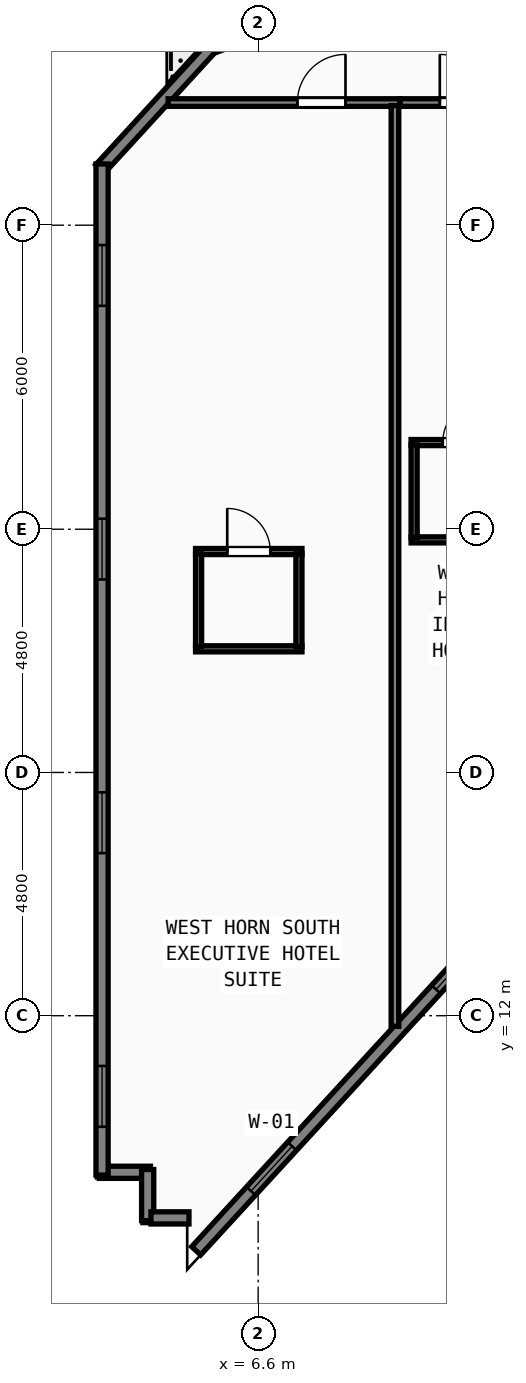
"""IFC4 building model, lengths in metres.
Left out: names, types, materials, properties, quantities, classifications, styles, units other than length and angle.
Written with IfcOpenShell. Run it as: python <this file> out.ifc"""

import sys

from ifc_helpers import new_model, si_unit, direction, frame, frame_2d, origin, origin_2d, place, context, subcontext, project, spatial, rectangle, hollow_rectangle, extrude, element, fill, save


model = new_model("IFC4")
c1 = context("Model", 3, precision=1e-05, world=origin(), true_north=direction((0.0, 1.0)))
c2 = subcontext(c1, "Body", "Model", "MODEL_VIEW")
j1 = project(units=[si_unit("LENGTHUNIT", "METRE"), si_unit("PLANEANGLEUNIT", "RADIAN")], contexts=[c1])
p1 = place(None, origin())
s1 = spatial("IfcSite", under=j1, at=p1, CompositionType="ELEMENT")
p2 = place(p1, origin())
s2 = spatial("IfcBuilding", under=s1, at=p2, CompositionType="ELEMENT")
p3 = place(p2, frame((0.0, 0.0, 24.0)))
s3 = spatial("IfcBuildingStorey", under=s2, at=p3, CompositionType="ELEMENT", Elevation=24.0)
for number, where, z_axis, x_axis in (
    (1, (6.0, 17.4, 0.0), (0.0, 0.0, 1.0), (1.0, 0.0, 0.0)),
    (2, (6.0, 27.6, 0.0), (0.0, 0.0, 1.0), (1.0, 0.0, 0.0)),
):
    element("IfcColumn", number, at=place(p3, frame(where, z_axis=z_axis, x_axis=x_axis)), inside=s3, PredefinedType="COLUMN", context=c2, shape_type="SweptSolid", body=[
        extrude(hollow_rectangle(XDim=1.15, YDim=1.15, WallThickness=0.042, at=origin_2d()), origin(), (0.0, 0.0, 1.0), 3.8),
    ])
for number, where, z_axis, x_axis in (
    (3, (9.3, 17.1, -0.26), (0.0, 0.0, 1.0), (1.0, 0.0, 0.0)),
    (4, (9.3, 27.6, -0.26), (0.0, 0.0, 1.0), (1.0, 0.0, 0.0)),
):
    element("IfcColumn", number, at=place(p3, frame(where, z_axis=z_axis, x_axis=x_axis)), inside=s3, PredefinedType="COLUMN", context=c2, shape_type="SweptSolid", body=[
        extrude(hollow_rectangle(XDim=1.0, YDim=1.0, WallThickness=0.038, at=origin_2d()), origin(), (0.0, 0.0, 1.0), 4.06),
    ])
for number, where, z_axis, x_axis in (
    (5, (3.465, 8.91, 0.0), (0.0, 0.0, 1.0), (1.0, 0.0, 0.0)),
    (6, (4.42, 8.965, 0.0), (0.0, 0.0, 1.0), (0.0, -1.0, 0.0)),
):
    element("IfcWall", number, at=place(p3, frame(where, z_axis=z_axis, x_axis=x_axis)), inside=s3, PredefinedType="SOLIDWALL", context=c2, shape_type="SweptSolid", body=[
        extrude(rectangle(XDim=1.01, YDim=0.24, at=frame_2d((0.505, 0.0))), origin(), (0.0, 0.0, 1.0), 3.6),
    ])
p4 = place(p3, frame((4.485, 8.01, 0.0), z_axis=(0.0, 0.0, 1.0), x_axis=(1.0, 0.0, 0.0)))
e7 = element("IfcWall", 7, at=p4, inside=s3, PredefinedType="SOLIDWALL", context=c2, shape_type="SweptSolid", body=[
    extrude(rectangle(XDim=0.75, YDim=0.24, at=frame_2d((0.375, 0.0))), origin(), (0.0, 0.0, 1.0), 3.6),
])
p5 = place(p3, frame((5.377, 7.361, 0.0), z_axis=(0.0, 0.0, 1.0), x_axis=(0.676129143807, 0.736783130165, 0.0)))
e8 = element("IfcWall", 8, at=p5, inside=s3, PredefinedType="SOLIDWALL", context=c2, shape_type="SweptSolid", body=[
    extrude(rectangle(XDim=9.672, YDim=0.24, at=frame_2d((4.836, 0.0))), origin(), (0.0, 0.0, 1.0), 3.6),
])
p6 = place(p5, frame((1.6, 0.0, 0.85)))
e9 = element("IfcOpeningElement", 9, at=p6, cuts=e8, PredefinedType="OPENING", context=c2, shape_type="SweptSolid", body=[
    extrude(rectangle(XDim=1.2, YDim=1.85, at=frame_2d((0.6, 0.925))), frame((0.0, 0.13, 0.0), z_axis=(0.0, -1.0, 0.0), x_axis=(1.0, 0.0, 0.0)), (0.0, 0.0, 1.0), 0.26),
])
p7 = place(p5, frame((7.0, 0.0, 0.85)))
e10 = element("IfcOpeningElement", 10, at=p7, cuts=e8, PredefinedType="OPENING", context=c2, shape_type="SweptSolid", body=[
    extrude(rectangle(XDim=1.2, YDim=1.85, at=frame_2d((0.6, 0.925))), frame((0.0, 0.13, 0.0), z_axis=(0.0, -1.0, 0.0), x_axis=(1.0, 0.0, 0.0)), (0.0, 0.0, 1.0), 0.26),
])
p8 = place(p3, frame((12.171, 33.536, 0.0), z_axis=(0.0, 0.0, 1.0), x_axis=(-0.936327744176, -0.351127263946, 0.0)))
e11 = element("IfcWall", 11, at=p8, inside=s3, PredefinedType="SOLIDWALL", context=c2, shape_type="SweptSolid", body=[
    extrude(rectangle(XDim=7.0, YDim=0.24, at=frame_2d((3.5, 0.0))), origin(), (0.0, 0.0, 1.0), 3.6),
])
p9 = place(p8, frame((1.6, 0.0, 0.85)))
e12 = element("IfcOpeningElement", 12, at=p9, cuts=e11, PredefinedType="OPENING", context=c2, shape_type="SweptSolid", body=[
    extrude(rectangle(XDim=1.2, YDim=1.85, at=frame_2d((0.6, 0.925))), frame((0.0, 0.13, 0.0), z_axis=(0.0, -1.0, 0.0), x_axis=(1.0, 0.0, 0.0)), (0.0, 0.0, 1.0), 0.26),
])
p10 = place(p3, frame((5.706, 31.138, 0.0), z_axis=(0.0, 0.0, 1.0), x_axis=(-0.675758228752, -0.737123338577, 0.0)))
e13 = element("IfcWall", 13, at=p10, inside=s3, PredefinedType="SOLIDWALL", context=c2, shape_type="SweptSolid", body=[
    extrude(rectangle(XDim=3.29, YDim=0.24, at=frame_2d((1.645, 0.0))), origin(), (0.0, 0.0, 1.0), 3.6),
])
p11 = place(p3, frame((3.52, 28.808, 0.0), z_axis=(0.0, 0.0, 1.0), x_axis=(0.0, -1.0, 0.0)))
e14 = element("IfcWall", 14, at=p11, inside=s3, PredefinedType="SOLIDWALL", context=c2, shape_type="SweptSolid", body=[
    extrude(rectangle(XDim=19.953, YDim=0.24, at=frame_2d((9.977, 0.0))), origin(), (0.0, 0.0, 1.0), 3.6),
])
p12 = place(p11, frame((1.6, 0.0, 0.85)))
e15 = element("IfcOpeningElement", 15, at=p12, cuts=e14, PredefinedType="OPENING", context=c2, shape_type="SweptSolid", body=[
    extrude(rectangle(XDim=1.2, YDim=1.85, at=frame_2d((0.6, 0.925))), frame((0.0, 0.13, 0.0), z_axis=(0.0, -1.0, 0.0), x_axis=(1.0, 0.0, 0.0)), (0.0, 0.0, 1.0), 0.26),
])
p13 = place(p11, frame((7.0, 0.0, 0.85)))
e16 = element("IfcOpeningElement", 16, at=p13, cuts=e14, PredefinedType="OPENING", context=c2, shape_type="SweptSolid", body=[
    extrude(rectangle(XDim=1.2, YDim=1.85, at=frame_2d((0.6, 0.925))), frame((0.0, 0.13, 0.0), z_axis=(0.0, -1.0, 0.0), x_axis=(1.0, 0.0, 0.0)), (0.0, 0.0, 1.0), 0.26),
])
p14 = place(p11, frame((12.4, 0.0, 0.85)))
e17 = element("IfcOpeningElement", 17, at=p14, cuts=e14, PredefinedType="OPENING", context=c2, shape_type="SweptSolid", body=[
    extrude(rectangle(XDim=1.2, YDim=1.85, at=frame_2d((0.6, 0.925))), frame((0.0, 0.13, 0.0), z_axis=(0.0, -1.0, 0.0), x_axis=(1.0, 0.0, 0.0)), (0.0, 0.0, 1.0), 0.26),
])
p15 = place(p11, frame((17.8, 0.0, 0.85)))
e18 = element("IfcOpeningElement", 18, at=p15, cuts=e14, PredefinedType="OPENING", context=c2, shape_type="SweptSolid", body=[
    extrude(rectangle(XDim=1.2, YDim=1.85, at=frame_2d((0.6, 0.925))), frame((0.0, 0.13, 0.0), z_axis=(0.0, -1.0, 0.0), x_axis=(1.0, 0.0, 0.0)), (0.0, 0.0, 1.0), 0.26),
])
p16 = place(p3, frame((4.823, 30.02, 0.0), z_axis=(0.0, 0.0, 1.0), x_axis=(1.0, 0.0, 0.0)))
e19 = element("IfcWall", 19, at=p16, inside=s3, PredefinedType="PARTITIONING", context=c2, shape_type="SweptSolid", body=[
    extrude(rectangle(XDim=4.576, YDim=0.15, at=frame_2d((2.288, 0.0))), origin(), (0.0, 0.0, 1.0), 3.6),
])
p17 = place(p16, frame((3.5, 0.0, 0.0), z_axis=(0.0, 0.0, 1.0), x_axis=(-1.0, 0.0, 0.0)))
e20 = element("IfcOpeningElement", 20, at=p17, cuts=e19, PredefinedType="OPENING", context=c2, shape_type="SweptSolid", body=[
    extrude(rectangle(XDim=0.95, YDim=2.18, at=frame_2d((0.475, 1.09))), frame((0.0, 0.085, 0.0), z_axis=(0.0, -1.0, 0.0), x_axis=(1.0, 0.0, 0.0)), (0.0, 0.0, 1.0), 0.17),
])
p18 = place(p3, frame((9.3, 11.791, 0.0), z_axis=(0.0, 0.0, 1.0), x_axis=(0.0, 1.0, 0.0)))
e21 = element("IfcWall", 21, at=p18, inside=s3, PredefinedType="PARTITIONING", context=c2, shape_type="SweptSolid", body=[
    extrude(rectangle(XDim=18.169, YDim=0.15, at=frame_2d((9.085, 0.0))), origin(), (0.0, 0.0, 1.0), 3.6),
])
p19 = place(p3, frame((5.365, 21.16, 0.0), z_axis=(0.0, 0.0, 1.0), x_axis=(1.0, 0.0, 0.0)))
e22 = element("IfcWall", 22, at=p19, inside=s3, PredefinedType="PARTITIONING", context=c2, shape_type="SweptSolid", body=[
    extrude(rectangle(XDim=2.1, YDim=0.12, at=frame_2d((1.05, 0.0))), origin(), (0.0, 0.0, 1.0), 3.6),
])
p20 = place(p19, frame((1.475, 0.0, 0.0), z_axis=(0.0, 0.0, 1.0), x_axis=(-1.0, 0.0, 0.0)))
e23 = element("IfcOpeningElement", 23, at=p20, cuts=e22, PredefinedType="OPENING", context=c2, shape_type="SweptSolid", body=[
    extrude(rectangle(XDim=0.85, YDim=2.1, at=frame_2d((0.425, 1.05))), frame((0.0, 0.07, 0.0), z_axis=(0.0, -1.0, 0.0), x_axis=(1.0, 0.0, 0.0)), (0.0, 0.0, 1.0), 0.14),
])
p21 = place(p3, frame((5.365, 19.24, 0.0), z_axis=(0.0, 0.0, 1.0), x_axis=(1.0, 0.0, 0.0)))
e24 = element("IfcWall", 24, at=p21, inside=s3, PredefinedType="PARTITIONING", context=c2, shape_type="SweptSolid", body=[
    extrude(rectangle(XDim=2.1, YDim=0.12, at=frame_2d((1.05, 0.0))), origin(), (0.0, 0.0, 1.0), 3.6),
])
for number, where, z_axis, x_axis in (
    (25, (5.425, 19.285, 0.0), (0.0, 0.0, 1.0), (0.0, 1.0, 0.0)),
    (26, (7.405, 19.285, 0.0), (0.0, 0.0, 1.0), (0.0, 1.0, 0.0)),
):
    element("IfcWall", number, at=place(p3, frame(where, z_axis=z_axis, x_axis=x_axis)), inside=s3, PredefinedType="PARTITIONING", context=c2, shape_type="SweptSolid", body=[
        extrude(rectangle(XDim=1.83, YDim=0.12, at=frame_2d((0.915, 0.0))), origin(), (0.0, 0.0, 1.0), 3.6),
    ])
p22 = place(p3, frame((9.402, 30.02, 0.0), z_axis=(0.0, 0.0, 1.0), x_axis=(1.0, 0.0, 0.0)))
e27 = element("IfcWall", 27, at=p22, inside=s3, PredefinedType="PARTITIONING", context=c2, shape_type="SweptSolid", body=[
    extrude(rectangle(XDim=2.718, YDim=0.15, at=frame_2d((1.359, 0.0))), origin(), (0.0, 0.0, 1.0), 3.6),
])
p23 = place(p22, frame((1.733, 0.0, 0.0), z_axis=(0.0, 0.0, 1.0), x_axis=(-1.0, 0.0, 0.0)))
e28 = element("IfcOpeningElement", 28, at=p23, cuts=e27, PredefinedType="OPENING", context=c2, shape_type="SweptSolid", body=[
    extrude(rectangle(XDim=0.95, YDim=2.15, at=frame_2d((0.475, 1.075))), frame((0.0, 0.085, 0.0), z_axis=(0.0, -1.0, 0.0), x_axis=(1.0, 0.0, 0.0)), (0.0, 0.0, 1.0), 0.17),
])
p24 = place(p3, frame((9.618, 23.31, 0.0), z_axis=(0.0, 0.0, 1.0), x_axis=(1.0, 0.0, 0.0)))
e29 = element("IfcWall", 29, at=p24, inside=s3, PredefinedType="PARTITIONING", context=c2, shape_type="SweptSolid", body=[
    extrude(rectangle(XDim=2.1, YDim=0.12, at=frame_2d((1.05, 0.0))), origin(), (0.0, 0.0, 1.0), 3.6),
])
p25 = place(p24, frame((1.475, 0.0, 0.0), z_axis=(0.0, 0.0, 1.0), x_axis=(-1.0, 0.0, 0.0)))
e30 = element("IfcOpeningElement", 30, at=p25, cuts=e29, PredefinedType="OPENING", context=c2, shape_type="SweptSolid", body=[
    extrude(rectangle(XDim=0.85, YDim=2.1, at=frame_2d((0.425, 1.05))), frame((0.0, 0.07, 0.0), z_axis=(0.0, -1.0, 0.0), x_axis=(1.0, 0.0, 0.0)), (0.0, 0.0, 1.0), 0.14),
])
p26 = place(p3, frame((9.618, 21.39, 0.0), z_axis=(0.0, 0.0, 1.0), x_axis=(1.0, 0.0, 0.0)))
e31 = element("IfcWall", 31, at=p26, inside=s3, PredefinedType="PARTITIONING", context=c2, shape_type="SweptSolid", body=[
    extrude(rectangle(XDim=2.1, YDim=0.12, at=frame_2d((1.05, 0.0))), origin(), (0.0, 0.0, 1.0), 3.6),
])
p27 = place(p3, frame((9.678, 21.435, 0.0), z_axis=(0.0, 0.0, 1.0), x_axis=(0.0, 1.0, 0.0)))
e32 = element("IfcWall", 32, at=p27, inside=s3, PredefinedType="PARTITIONING", context=c2, shape_type="SweptSolid", body=[
    extrude(rectangle(XDim=1.83, YDim=0.12, at=frame_2d((0.915, 0.0))), origin(), (0.0, 0.0, 1.0), 3.6),
])
p28 = place(p6, origin())
e33 = element("IfcWindow", 33, at=p28, inside=s3, PartitioningType="SINGLE_PANEL", PredefinedType="WINDOW", context=c2, shape_type="SweptSolid", body=[
    extrude(rectangle(XDim=1.2, YDim=1.85, at=frame_2d((0.6, 0.925))), frame((0.0, 0.03, 0.0), z_axis=(0.0, -1.0, 0.0), x_axis=(1.0, 0.0, 0.0)), (0.0, 0.0, 1.0), 0.06),
])
fill(e9, e33)
p29 = place(p7, origin())
e34 = element("IfcWindow", 34, at=p29, inside=s3, PartitioningType="SINGLE_PANEL", PredefinedType="WINDOW", context=c2, shape_type="SweptSolid", body=[
    extrude(rectangle(XDim=1.2, YDim=1.85, at=frame_2d((0.6, 0.925))), frame((0.0, 0.03, 0.0), z_axis=(0.0, -1.0, 0.0), x_axis=(1.0, 0.0, 0.0)), (0.0, 0.0, 1.0), 0.06),
])
fill(e10, e34)
p30 = place(p12, origin())
e35 = element("IfcWindow", 35, at=p30, inside=s3, PartitioningType="SINGLE_PANEL", PredefinedType="WINDOW", context=c2, shape_type="SweptSolid", body=[
    extrude(rectangle(XDim=1.2, YDim=1.85, at=frame_2d((0.6, 0.925))), frame((0.0, 0.03, 0.0), z_axis=(0.0, -1.0, 0.0), x_axis=(1.0, 0.0, 0.0)), (0.0, 0.0, 1.0), 0.06),
])
fill(e15, e35)
p31 = place(p13, origin())
e36 = element("IfcWindow", 36, at=p31, inside=s3, PartitioningType="SINGLE_PANEL", PredefinedType="WINDOW", context=c2, shape_type="SweptSolid", body=[
    extrude(rectangle(XDim=1.2, YDim=1.85, at=frame_2d((0.6, 0.925))), frame((0.0, 0.03, 0.0), z_axis=(0.0, -1.0, 0.0), x_axis=(1.0, 0.0, 0.0)), (0.0, 0.0, 1.0), 0.06),
])
fill(e16, e36)
p32 = place(p14, origin())
e37 = element("IfcWindow", 37, at=p32, inside=s3, PartitioningType="SINGLE_PANEL", PredefinedType="WINDOW", context=c2, shape_type="SweptSolid", body=[
    extrude(rectangle(XDim=1.2, YDim=1.85, at=frame_2d((0.6, 0.925))), frame((0.0, 0.03, 0.0), z_axis=(0.0, -1.0, 0.0), x_axis=(1.0, 0.0, 0.0)), (0.0, 0.0, 1.0), 0.06),
])
fill(e17, e37)
p33 = place(p15, origin())
e38 = element("IfcWindow", 38, at=p33, inside=s3, PartitioningType="SINGLE_PANEL", PredefinedType="WINDOW", context=c2, shape_type="SweptSolid", body=[
    extrude(rectangle(XDim=1.2, YDim=1.85, at=frame_2d((0.6, 0.925))), frame((0.0, 0.03, 0.0), z_axis=(0.0, -1.0, 0.0), x_axis=(1.0, 0.0, 0.0)), (0.0, 0.0, 1.0), 0.06),
])
fill(e18, e38)
p34 = place(p17, origin())
e39 = element("IfcDoor", 39, at=p34, inside=s3, OperationType="SINGLE_SWING_LEFT", PredefinedType="DOOR", context=c2, shape_type="SweptSolid", body=[
    extrude(rectangle(XDim=0.95, YDim=2.18, at=frame_2d((0.475, 1.09))), frame((0.0, 0.025, 0.0), z_axis=(0.0, -1.0, 0.0), x_axis=(1.0, 0.0, 0.0)), (0.0, 0.0, 1.0), 0.05),
])
fill(e20, e39)
p35 = place(p20, origin())
e40 = element("IfcDoor", 40, at=p35, inside=s3, OperationType="SINGLE_SWING_RIGHT", PredefinedType="DOOR", context=c2, shape_type="SweptSolid", body=[
    extrude(rectangle(XDim=0.85, YDim=2.1, at=frame_2d((0.425, 1.05))), frame((0.0, 0.025, 0.0), z_axis=(0.0, -1.0, 0.0), x_axis=(1.0, 0.0, 0.0)), (0.0, 0.0, 1.0), 0.05),
])
fill(e23, e40)
p36 = place(p23, origin())
e41 = element("IfcDoor", 41, at=p36, inside=s3, OperationType="SINGLE_SWING_RIGHT", PredefinedType="DOOR", context=c2, shape_type="SweptSolid", body=[
    extrude(rectangle(XDim=0.95, YDim=2.15, at=frame_2d((0.475, 1.075))), frame((0.0, 0.025, 0.0), z_axis=(0.0, -1.0, 0.0), x_axis=(1.0, 0.0, 0.0)), (0.0, 0.0, 1.0), 0.05),
])
fill(e28, e41)
p37 = place(p25, origin())
e42 = element("IfcDoor", 42, at=p37, inside=s3, OperationType="SINGLE_SWING_LEFT", PredefinedType="DOOR", context=c2, shape_type="SweptSolid", body=[
    extrude(rectangle(XDim=0.85, YDim=2.1, at=frame_2d((0.425, 1.05))), frame((0.0, 0.025, 0.0), z_axis=(0.0, -1.0, 0.0), x_axis=(1.0, 0.0, 0.0)), (0.0, 0.0, 1.0), 0.05),
])
fill(e30, e42)
save(model, sys.argv[1])
